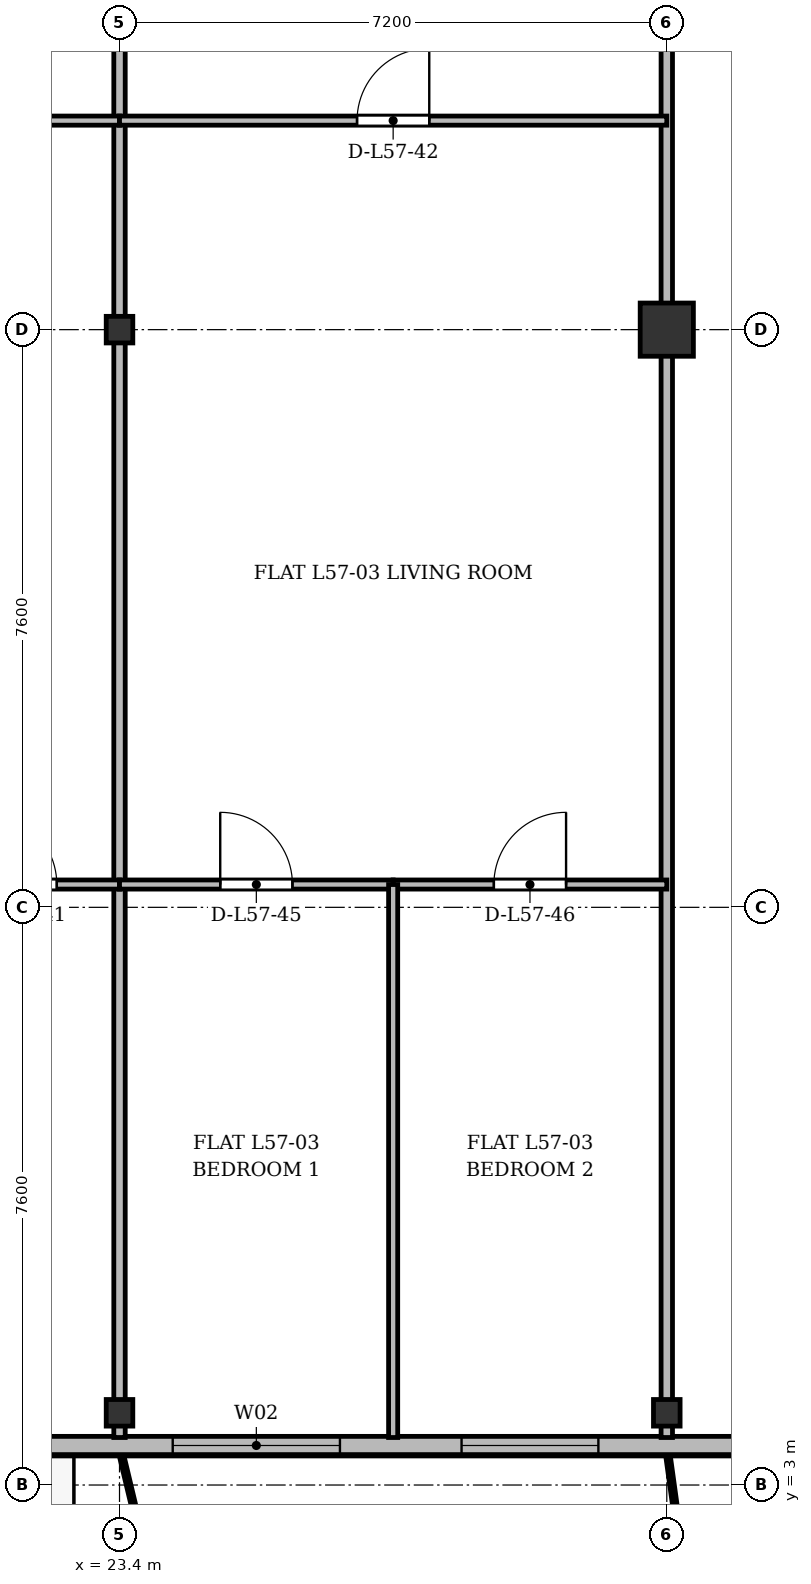
"""IFC4 building model, lengths in metres.
Left out: names, types, materials, properties, quantities, classifications, styles, units other than length and angle.
Written with IfcOpenShell. Run it as: python <this file> out.ifc"""

import sys

from ifc_helpers import new_model, si_unit, direction, frame, frame_2d, origin, origin_2d, place, context, subcontext, project, spatial, rectangle, i_section, extrude, source, transform, mapped, element, fill, save


model = new_model("IFC4")
c1 = context("Model", 3, precision=1e-05, world=origin(), true_north=direction((0.0, 1.0)))
c2 = subcontext(c1, "Body", "Model", "MODEL_VIEW")
j1 = project(units=[si_unit("LENGTHUNIT", "METRE"), si_unit("PLANEANGLEUNIT", "RADIAN")], contexts=[c1])
p1 = place(None, origin())
s1 = spatial("IfcSite", under=j1, at=p1, CompositionType="ELEMENT")
p2 = place(p1, origin())
s2 = spatial("IfcBuilding", under=s1, at=p2, CompositionType="ELEMENT")
p3 = place(p2, frame((0.0, 0.0, 219.3)))
s3 = spatial("IfcBuildingStorey", under=s2, at=p3, CompositionType="ELEMENT", Elevation=219.3)
m1 = source(origin(), c2, "Body", "SweptSolid", [
    extrude(i_section(OverallWidth=0.35, OverallDepth=0.35, WebThickness=0.018, FlangeThickness=0.028, at=origin_2d()), origin(), (0.0, 0.0, 1.0), 3.6),
])
for number, where, z_axis, x_axis in (
    (1, (23.4, 3.95, 0.0), (0.0, 0.0, 1.0), (1.0, 0.0, 0.0)),
    (2, (23.4, 18.2, 0.0), (0.0, 0.0, 1.0), (1.0, 0.0, 0.0)),
    (3, (30.6, 3.95, 0.0), (0.0, 0.0, 1.0), (1.0, 0.0, 0.0)),
):
    element("IfcColumn", number, at=place(p3, frame(where, z_axis=z_axis, x_axis=x_axis)), inside=s3, PredefinedType="COLUMN", context=c2, shape_type="MappedRepresentation", body=[
        mapped(m1, transform((0.0, 0.0, 0.0), x_axis=(1.0, 0.0, 0.0), y_axis=(0.0, 1.0, 0.0), z_axis=(0.0, 0.0, 1.0), scale=1.0)),
    ])
m2 = source(origin(), c2, "Body", "SweptSolid", [
    extrude(rectangle(XDim=0.7, YDim=0.7, at=origin_2d()), origin(), (0.0, 0.0, 1.0), 3.6),
])
p4 = place(p3, frame((30.6, 18.2, 0.0), z_axis=(0.0, 0.0, 1.0), x_axis=(1.0, 0.0, 0.0)))
e4 = element("IfcColumn", 4, at=p4, inside=s3, PredefinedType="COLUMN", context=c2, shape_type="MappedRepresentation", body=[
    mapped(m2, transform((0.0, 0.0, 0.0), x_axis=(1.0, 0.0, 0.0), y_axis=(0.0, 1.0, 0.0), z_axis=(0.0, 0.0, 1.0), scale=1.0)),
])
p5 = place(p3, frame((63.4, 3.52, 0.0), z_axis=(0.0, 0.0, 1.0), x_axis=(-1.0, 0.0, 0.0)))
e5 = element("IfcWall", 5, at=p5, inside=s3, PredefinedType="SOLIDWALL", context=c2, shape_type="SweptSolid", body=[
    extrude(rectangle(XDim=52.4, YDim=0.24, at=frame_2d((26.2, 0.0))), origin(), (0.0, 0.0, 1.0), 3.36),
])
p6 = place(p5, frame((1.595, 0.0, 0.9)))
e6 = element("IfcOpeningElement", 6, at=p6, cuts=e5, PredefinedType="OPENING", context=c2, shape_type="SweptSolid", body=[
    extrude(rectangle(XDim=1.5, YDim=1.75, at=frame_2d((0.75, 0.875))), frame((0.0, 0.13, 0.0), z_axis=(0.0, -1.0, 0.0), x_axis=(1.0, 0.0, 0.0)), (0.0, 0.0, 1.0), 0.26),
])
p7 = place(p5, frame((7.5, 0.0, 0.9)))
e7 = element("IfcOpeningElement", 7, at=p7, cuts=e5, PredefinedType="OPENING", context=c2, shape_type="SweptSolid", body=[
    extrude(rectangle(XDim=2.0, YDim=1.95, at=frame_2d((1.0, 0.975))), frame((0.0, 0.13, 0.0), z_axis=(0.0, -1.0, 0.0), x_axis=(1.0, 0.0, 0.0)), (0.0, 0.0, 1.0), 0.26),
])
p8 = place(p5, frame((13.42, 0.0, 0.0)))
e8 = element("IfcOpeningElement", 8, at=p8, cuts=e5, PredefinedType="OPENING", context=c2, shape_type="SweptSolid", body=[
    extrude(rectangle(XDim=1.2, YDim=2.2, at=frame_2d((0.6, 1.1))), frame((0.0, 0.13, 0.0), z_axis=(0.0, -1.0, 0.0), x_axis=(1.0, 0.0, 0.0)), (0.0, 0.0, 1.0), 0.26),
])
p9 = place(p5, frame((15.1, 0.0, 0.9)))
e9 = element("IfcOpeningElement", 9, at=p9, cuts=e5, PredefinedType="OPENING", context=c2, shape_type="SweptSolid", body=[
    extrude(rectangle(XDim=1.8, YDim=1.8, at=frame_2d((0.9, 0.9))), frame((0.0, 0.13, 0.0), z_axis=(0.0, -1.0, 0.0), x_axis=(1.0, 0.0, 0.0)), (0.0, 0.0, 1.0), 0.26),
])
p10 = place(p5, frame((17.65, 0.0, 0.9)))
e10 = element("IfcOpeningElement", 10, at=p10, cuts=e5, PredefinedType="OPENING", context=c2, shape_type="SweptSolid", body=[
    extrude(rectangle(XDim=1.5, YDim=1.75, at=frame_2d((0.75, 0.875))), frame((0.0, 0.13, 0.0), z_axis=(0.0, -1.0, 0.0), x_axis=(1.0, 0.0, 0.0)), (0.0, 0.0, 1.0), 0.26),
])
p11 = place(p5, frame((20.5, 0.0, 0.9)))
e11 = element("IfcOpeningElement", 11, at=p11, cuts=e5, PredefinedType="OPENING", context=c2, shape_type="SweptSolid", body=[
    extrude(rectangle(XDim=1.5, YDim=1.75, at=frame_2d((0.75, 0.875))), frame((0.0, 0.13, 0.0), z_axis=(0.0, -1.0, 0.0), x_axis=(1.0, 0.0, 0.0)), (0.0, 0.0, 1.0), 0.26),
])
p12 = place(p5, frame((23.55, 0.0, 0.9)))
e12 = element("IfcOpeningElement", 12, at=p12, cuts=e5, PredefinedType="OPENING", context=c2, shape_type="SweptSolid", body=[
    extrude(rectangle(XDim=2.0, YDim=1.95, at=frame_2d((1.0, 0.975))), frame((0.0, 0.13, 0.0), z_axis=(0.0, -1.0, 0.0), x_axis=(1.0, 0.0, 0.0)), (0.0, 0.0, 1.0), 0.26),
])
p13 = place(p5, frame((28.675, 0.0, 0.9)))
e13 = element("IfcOpeningElement", 13, at=p13, cuts=e5, PredefinedType="OPENING", context=c2, shape_type="SweptSolid", body=[
    extrude(rectangle(XDim=1.65, YDim=1.85, at=frame_2d((0.825, 0.925))), frame((0.0, 0.13, 0.0), z_axis=(0.0, -1.0, 0.0), x_axis=(1.0, 0.0, 0.0)), (0.0, 0.0, 1.0), 0.26),
])
p14 = place(p5, frame((33.7, 0.0, 0.9)))
e14 = element("IfcOpeningElement", 14, at=p14, cuts=e5, PredefinedType="OPENING", context=c2, shape_type="SweptSolid", body=[
    extrude(rectangle(XDim=1.8, YDim=1.8, at=frame_2d((0.9, 0.9))), frame((0.0, 0.13, 0.0), z_axis=(0.0, -1.0, 0.0), x_axis=(1.0, 0.0, 0.0)), (0.0, 0.0, 1.0), 0.26),
])
p15 = place(p5, frame((37.1, 0.0, 0.9)))
e15 = element("IfcOpeningElement", 15, at=p15, cuts=e5, PredefinedType="OPENING", context=c2, shape_type="SweptSolid", body=[
    extrude(rectangle(XDim=2.2, YDim=1.8, at=frame_2d((1.1, 0.9))), frame((0.0, 0.13, 0.0), z_axis=(0.0, -1.0, 0.0), x_axis=(1.0, 0.0, 0.0)), (0.0, 0.0, 1.0), 0.26),
])
p16 = place(p5, frame((41.09, 0.0, 0.0)))
e16 = element("IfcOpeningElement", 16, at=p16, cuts=e5, PredefinedType="OPENING", context=c2, shape_type="SweptSolid", body=[
    extrude(rectangle(XDim=1.2, YDim=2.2, at=frame_2d((0.6, 1.1))), frame((0.0, 0.13, 0.0), z_axis=(0.0, -1.0, 0.0), x_axis=(1.0, 0.0, 0.0)), (0.0, 0.0, 1.0), 0.26),
])
p17 = place(p5, frame((42.9, 0.0, 0.9)))
e17 = element("IfcOpeningElement", 17, at=p17, cuts=e5, PredefinedType="OPENING", context=c2, shape_type="SweptSolid", body=[
    extrude(rectangle(XDim=2.0, YDim=1.95, at=frame_2d((1.0, 0.975))), frame((0.0, 0.13, 0.0), z_axis=(0.0, -1.0, 0.0), x_axis=(1.0, 0.0, 0.0)), (0.0, 0.0, 1.0), 0.26),
])
p18 = place(p5, frame((45.675, 0.0, 0.9)))
e18 = element("IfcOpeningElement", 18, at=p18, cuts=e5, PredefinedType="OPENING", context=c2, shape_type="SweptSolid", body=[
    extrude(rectangle(XDim=1.65, YDim=1.85, at=frame_2d((0.825, 0.925))), frame((0.0, 0.13, 0.0), z_axis=(0.0, -1.0, 0.0), x_axis=(1.0, 0.0, 0.0)), (0.0, 0.0, 1.0), 0.26),
])
p19 = place(p5, frame((49.155, 0.0, 0.9)))
e19 = element("IfcOpeningElement", 19, at=p19, cuts=e5, PredefinedType="OPENING", context=c2, shape_type="SweptSolid", body=[
    extrude(rectangle(XDim=1.8, YDim=1.8, at=frame_2d((0.9, 0.9))), frame((0.0, 0.13, 0.0), z_axis=(0.0, -1.0, 0.0), x_axis=(1.0, 0.0, 0.0)), (0.0, 0.0, 1.0), 0.26),
])
for number, where, z_axis, x_axis in (
    (20, (23.4, 3.625, 0.0), (0.0, 0.0, 1.0), (0.0, 1.0, 0.0)),
    (21, (30.6, 3.625, 0.0), (0.0, 0.0, 1.0), (0.0, 1.0, 0.0)),
):
    element("IfcWall", number, at=place(p3, frame(where, z_axis=z_axis, x_axis=x_axis)), inside=s3, PredefinedType="PARTITIONING", context=c2, shape_type="SweptSolid", body=[
        extrude(rectangle(XDim=27.375, YDim=0.15, at=frame_2d((13.688, 0.0))), origin(), (0.0, 0.0, 1.0), 2.86),
    ])
p20 = place(p3, frame((15.6, 20.95, 0.0), z_axis=(0.0, 0.0, 1.0), x_axis=(1.0, 0.0, 0.0)))
e22 = element("IfcWall", 22, at=p20, inside=s3, PredefinedType="PARTITIONING", context=c2, shape_type="SweptSolid", body=[
    extrude(rectangle(XDim=7.8, YDim=0.12, at=frame_2d((3.9, 0.0))), origin(), (0.0, 0.0, 1.0), 2.86),
])
p21 = place(p20, frame((3.333, 0.0, 0.0)))
e23 = element("IfcOpeningElement", 23, at=p21, cuts=e22, PredefinedType="OPENING", context=c2, shape_type="SweptSolid", body=[
    extrude(rectangle(XDim=0.95, YDim=2.15, at=frame_2d((0.475, 1.075))), frame((0.0, 0.07, 0.0), z_axis=(0.0, -1.0, 0.0), x_axis=(1.0, 0.0, 0.0)), (0.0, 0.0, 1.0), 0.14),
])
p22 = place(p3, frame((20.8, 10.9, 0.0), z_axis=(0.0, 0.0, 1.0), x_axis=(1.0, 0.0, 0.0)))
e24 = element("IfcWall", 24, at=p22, inside=s3, PredefinedType="PARTITIONING", context=c2, shape_type="SweptSolid", body=[
    extrude(rectangle(XDim=2.6, YDim=0.12, at=frame_2d((1.3, 0.0))), origin(), (0.0, 0.0, 1.0), 2.86),
])
p23 = place(p22, frame((0.825, 0.0, 0.0)))
e25 = element("IfcOpeningElement", 25, at=p23, cuts=e24, PredefinedType="OPENING", context=c2, shape_type="SweptSolid", body=[
    extrude(rectangle(XDim=0.95, YDim=2.15, at=frame_2d((0.475, 1.075))), frame((0.0, 0.07, 0.0), z_axis=(0.0, -1.0, 0.0), x_axis=(1.0, 0.0, 0.0)), (0.0, 0.0, 1.0), 0.14),
])
p24 = place(p3, frame((23.4, 20.95, 0.0), z_axis=(0.0, 0.0, 1.0), x_axis=(1.0, 0.0, 0.0)))
e26 = element("IfcWall", 26, at=p24, inside=s3, PredefinedType="PARTITIONING", context=c2, shape_type="SweptSolid", body=[
    extrude(rectangle(XDim=7.2, YDim=0.12, at=frame_2d((3.6, 0.0))), origin(), (0.0, 0.0, 1.0), 2.86),
])
p25 = place(p24, frame((3.125, 0.0, 0.0)))
e27 = element("IfcOpeningElement", 27, at=p25, cuts=e26, PredefinedType="OPENING", context=c2, shape_type="SweptSolid", body=[
    extrude(rectangle(XDim=0.95, YDim=2.15, at=frame_2d((0.475, 1.075))), frame((0.0, 0.07, 0.0), z_axis=(0.0, -1.0, 0.0), x_axis=(1.0, 0.0, 0.0)), (0.0, 0.0, 1.0), 0.14),
])
p26 = place(p3, frame((23.4, 10.9, 0.0), z_axis=(0.0, 0.0, 1.0), x_axis=(1.0, 0.0, 0.0)))
e28 = element("IfcWall", 28, at=p26, inside=s3, PredefinedType="PARTITIONING", context=c2, shape_type="SweptSolid", body=[
    extrude(rectangle(XDim=3.6, YDim=0.12, at=frame_2d((1.8, 0.0))), origin(), (0.0, 0.0, 1.0), 2.86),
])
p27 = place(p26, frame((1.325, 0.0, 0.0)))
e29 = element("IfcOpeningElement", 29, at=p27, cuts=e28, PredefinedType="OPENING", context=c2, shape_type="SweptSolid", body=[
    extrude(rectangle(XDim=0.95, YDim=2.15, at=frame_2d((0.475, 1.075))), frame((0.0, 0.07, 0.0), z_axis=(0.0, -1.0, 0.0), x_axis=(1.0, 0.0, 0.0)), (0.0, 0.0, 1.0), 0.14),
])
p28 = place(p3, frame((27.0, 10.9, 0.0), z_axis=(0.0, 0.0, 1.0), x_axis=(1.0, 0.0, 0.0)))
e30 = element("IfcWall", 30, at=p28, inside=s3, PredefinedType="PARTITIONING", context=c2, shape_type="SweptSolid", body=[
    extrude(rectangle(XDim=3.6, YDim=0.12, at=frame_2d((1.8, 0.0))), origin(), (0.0, 0.0, 1.0), 2.86),
])
p29 = place(p28, frame((1.325, 0.0, 0.0)))
e31 = element("IfcOpeningElement", 31, at=p29, cuts=e30, PredefinedType="OPENING", context=c2, shape_type="SweptSolid", body=[
    extrude(rectangle(XDim=0.95, YDim=2.15, at=frame_2d((0.475, 1.075))), frame((0.0, 0.07, 0.0), z_axis=(0.0, -1.0, 0.0), x_axis=(1.0, 0.0, 0.0)), (0.0, 0.0, 1.0), 0.14),
])
p30 = place(p3, frame((27.0, 3.625, 0.0), z_axis=(0.0, 0.0, 1.0), x_axis=(0.0, 1.0, 0.0)))
e32 = element("IfcWall", 32, at=p30, inside=s3, PredefinedType="PARTITIONING", context=c2, shape_type="SweptSolid", body=[
    extrude(rectangle(XDim=7.275, YDim=0.12, at=frame_2d((3.637, 0.0))), origin(), (0.0, 0.0, 1.0), 2.91),
])
m3 = source(origin(), c2, "Body", "SweptSolid", [
    extrude(rectangle(XDim=1.8, YDim=1.8, at=frame_2d((0.9, 0.9))), frame((0.0, 0.03, 0.0), z_axis=(0.0, -1.0, 0.0), x_axis=(1.0, 0.0, 0.0)), (0.0, 0.0, 1.0), 0.06),
])
p31 = place(p14, origin())
e33 = element("IfcWindow", 33, at=p31, inside=s3, PartitioningType="SINGLE_PANEL", PredefinedType="WINDOW", context=c2, shape_type="MappedRepresentation", body=[
    mapped(m3, transform((0.0, 0.0, 0.0), x_axis=(1.0, 0.0, 0.0), y_axis=(0.0, 1.0, 0.0), z_axis=(0.0, 0.0, 1.0), scale=1.0)),
])
fill(e14, e33)
m4 = source(origin(), c2, "Body", "SweptSolid", [
    extrude(rectangle(XDim=2.2, YDim=1.8, at=frame_2d((1.1, 0.9))), frame((0.0, 0.03, 0.0), z_axis=(0.0, -1.0, 0.0), x_axis=(1.0, 0.0, 0.0)), (0.0, 0.0, 1.0), 0.06),
])
p32 = place(p15, origin())
e34 = element("IfcWindow", 34, at=p32, inside=s3, PartitioningType="SINGLE_PANEL", PredefinedType="WINDOW", context=c2, shape_type="MappedRepresentation", body=[
    mapped(m4, transform((0.0, 0.0, 0.0), x_axis=(1.0, 0.0, 0.0), y_axis=(0.0, 1.0, 0.0), z_axis=(0.0, 0.0, 1.0), scale=1.0)),
])
fill(e15, e34)
m5 = source(origin(), c2, "Body", "SweptSolid", [
    extrude(rectangle(XDim=0.95, YDim=2.15, at=frame_2d((0.475, 1.075))), frame((0.0, 0.025, 0.0), z_axis=(0.0, -1.0, 0.0), x_axis=(1.0, 0.0, 0.0)), (0.0, 0.0, 1.0), 0.05),
])
p33 = place(p23, origin())
e35 = element("IfcDoor", 35, at=p33, inside=s3, OperationType="SINGLE_SWING_LEFT", PredefinedType="DOOR", context=c2, shape_type="MappedRepresentation", body=[
    mapped(m5, transform((0.0, 0.0, 0.0), x_axis=(1.0, 0.0, 0.0), y_axis=(0.0, 1.0, 0.0), z_axis=(0.0, 0.0, 1.0), scale=1.0)),
])
fill(e25, e35)
p34 = place(p25, origin())
e36 = element("IfcDoor", 36, at=p34, inside=s3, OperationType="SINGLE_SWING_RIGHT", PredefinedType="DOOR", context=c2, shape_type="MappedRepresentation", body=[
    mapped(m5, transform((0.0, 0.0, 0.0), x_axis=(1.0, 0.0, 0.0), y_axis=(0.0, 1.0, 0.0), z_axis=(0.0, 0.0, 1.0), scale=1.0)),
])
fill(e27, e36)
p35 = place(p27, origin())
e37 = element("IfcDoor", 37, at=p35, inside=s3, OperationType="SINGLE_SWING_LEFT", PredefinedType="DOOR", context=c2, shape_type="MappedRepresentation", body=[
    mapped(m5, transform((0.0, 0.0, 0.0), x_axis=(1.0, 0.0, 0.0), y_axis=(0.0, 1.0, 0.0), z_axis=(0.0, 0.0, 1.0), scale=1.0)),
])
fill(e29, e37)
p36 = place(p29, origin())
e38 = element("IfcDoor", 38, at=p36, inside=s3, OperationType="SINGLE_SWING_RIGHT", PredefinedType="DOOR", context=c2, shape_type="MappedRepresentation", body=[
    mapped(m5, transform((0.0, 0.0, 0.0), x_axis=(1.0, 0.0, 0.0), y_axis=(0.0, 1.0, 0.0), z_axis=(0.0, 0.0, 1.0), scale=1.0)),
])
fill(e31, e38)
save(model, sys.argv[1])
